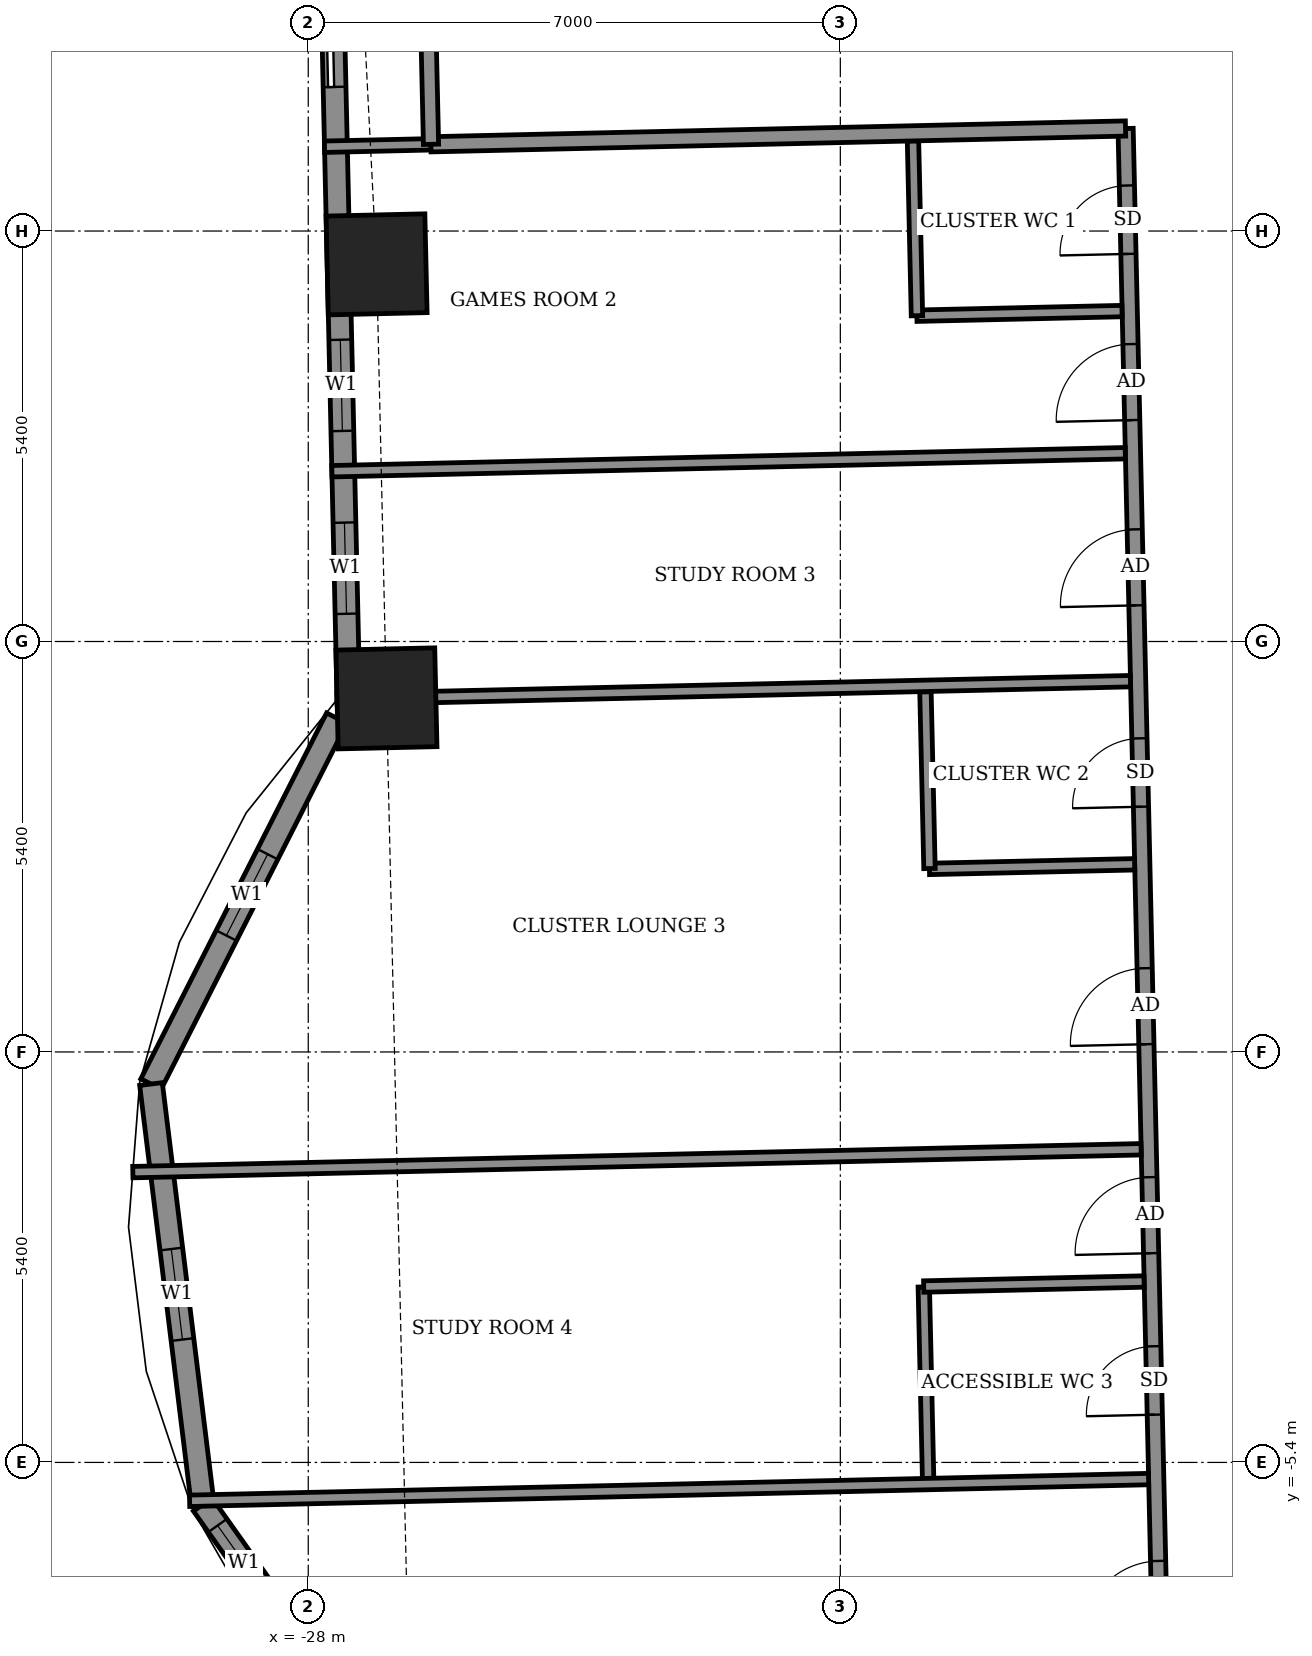
"""IFC4 building model, lengths in metres.
Left out: names, types, materials, properties, quantities, classifications, styles, units other than length and angle.
Written with IfcOpenShell. Run it as: python <this file> out.ifc"""

import sys

from ifc_helpers import new_model, si_unit, direction, frame, frame_2d, origin, origin_2d, place, context, subcontext, project, spatial, rectangle, extrude, element, fill, save


model = new_model("IFC4")
c1 = context("Model", 3, precision=1e-05, world=origin(), true_north=direction((0.0, 1.0)))
c2 = subcontext(c1, "Body", "Model", "MODEL_VIEW")
j1 = project(units=[si_unit("LENGTHUNIT", "METRE"), si_unit("PLANEANGLEUNIT", "RADIAN")], contexts=[c1])
p1 = place(None, origin())
s1 = spatial("IfcSite", under=j1, at=p1, CompositionType="ELEMENT")
p2 = place(p1, origin())
s2 = spatial("IfcBuilding", under=s1, at=p2, CompositionType="ELEMENT")
p3 = place(p2, frame((0.0, 0.0, 137.3)))
s3 = spatial("IfcBuildingStorey", under=s2, at=p3, CompositionType="ELEMENT", Elevation=137.3)
for number, where, z_axis, x_axis in (
    (1, (-27.101, 10.362, -0.55), (0.0, 0.0, 1.0), (0.023, -1.0, 0.0)),
    (2, (-26.971, 4.652, -0.55), (0.0, 0.0, 1.0), (0.023, -1.0, 0.0)),
):
    element("IfcColumn", number, at=place(p3, frame(where, z_axis=z_axis, x_axis=x_axis)), inside=s3, PredefinedType="COLUMN", context=c2, shape_type="SweptSolid", body=[
        extrude(rectangle(XDim=1.3, YDim=1.3, at=origin_2d()), origin(), (0.0, 0.0, 1.0), 3.6),
    ])
p4 = place(p3, frame((-27.727, 15.912, 0.0), z_axis=(0.0, 0.0, 1.0), x_axis=(0.022690078929, -0.999742547018, 0.0)))
e3 = element("IfcWall", 3, at=p4, inside=s3, PredefinedType="SOLIDWALL", context=c2, shape_type="SweptSolid", body=[
    extrude(rectangle(XDim=11.33, YDim=0.3, at=frame_2d((5.665, 0.0))), origin(), (0.0, 0.0, 1.0), 3.05),
])
p5 = place(p4, frame((1.717, 0.0, 0.0)))
e4 = element("IfcOpeningElement", 4, at=p5, cuts=e3, PredefinedType="OPENING", context=c2, shape_type="SweptSolid", body=[
    extrude(rectangle(XDim=1.5, YDim=2.4, at=frame_2d((0.75, 1.2))), frame((0.0, 0.16, 0.0), z_axis=(0.0, -1.0, 0.0), x_axis=(1.0, 0.0, 0.0)), (0.0, 0.0, 1.0), 0.32),
])
p6 = place(p4, frame((6.544, 0.0, 0.9)))
e5 = element("IfcOpeningElement", 5, at=p6, cuts=e3, PredefinedType="OPENING", context=c2, shape_type="SweptSolid", body=[
    extrude(rectangle(XDim=1.2, YDim=1.5, at=frame_2d((0.6, 0.75))), frame((0.0, 0.16, 0.0), z_axis=(0.0, -1.0, 0.0), x_axis=(1.0, 0.0, 0.0)), (0.0, 0.0, 1.0), 0.32),
])
p7 = place(p4, frame((8.95, 0.0, 0.9)))
e6 = element("IfcOpeningElement", 6, at=p7, cuts=e3, PredefinedType="OPENING", context=c2, shape_type="SweptSolid", body=[
    extrude(rectangle(XDim=1.2, YDim=1.5, at=frame_2d((0.6, 0.75))), frame((0.0, 0.16, 0.0), z_axis=(0.0, -1.0, 0.0), x_axis=(1.0, 0.0, 0.0)), (0.0, 0.0, 1.0), 0.32),
])
p8 = place(p3, frame((-27.625, 4.392, 0.0), z_axis=(0.0, 0.0, 1.0), x_axis=(-0.45268572245, -0.891670138947, 0.0)))
e7 = element("IfcWall", 7, at=p8, inside=s3, PredefinedType="SOLIDWALL", context=c2, shape_type="SweptSolid", body=[
    extrude(rectangle(XDim=5.399, YDim=0.3, at=frame_2d((2.7, 0.0))), origin(), (0.0, 0.0, 1.0), 3.05),
])
p9 = place(p8, frame((2.008, 0.0, 0.9)))
e8 = element("IfcOpeningElement", 8, at=p9, cuts=e7, PredefinedType="OPENING", context=c2, shape_type="SweptSolid", body=[
    extrude(rectangle(XDim=1.2, YDim=1.5, at=frame_2d((0.6, 0.75))), frame((0.0, 0.16, 0.0), z_axis=(0.0, -1.0, 0.0), x_axis=(1.0, 0.0, 0.0)), (0.0, 0.0, 1.0), 0.32),
])
p10 = place(p3, frame((-30.069, -0.422, 0.0), z_axis=(0.0, 0.0, 1.0), x_axis=(0.122206978992, -0.992504636909, 0.0)))
e9 = element("IfcWall", 9, at=p10, inside=s3, PredefinedType="SOLIDWALL", context=c2, shape_type="SweptSolid", body=[
    extrude(rectangle(XDim=5.574, YDim=0.3, at=frame_2d((2.787, 0.0))), origin(), (0.0, 0.0, 1.0), 3.05),
])
p11 = place(p10, frame((2.187, 0.0, 0.9)))
e10 = element("IfcOpeningElement", 10, at=p11, cuts=e9, PredefinedType="OPENING", context=c2, shape_type="SweptSolid", body=[
    extrude(rectangle(XDim=1.2, YDim=1.5, at=frame_2d((0.6, 0.75))), frame((0.0, 0.16, 0.0), z_axis=(0.0, -1.0, 0.0), x_axis=(1.0, 0.0, 0.0)), (0.0, 0.0, 1.0), 0.32),
])
p12 = place(p3, frame((-29.388, -5.954, 0.0), z_axis=(0.0, 0.0, 1.0), x_axis=(0.578095163598, -0.815969351033, 0.0)))
e11 = element("IfcWall", 11, at=p12, inside=s3, PredefinedType="SOLIDWALL", context=c2, shape_type="SweptSolid", body=[
    extrude(rectangle(XDim=3.569, YDim=0.3, at=frame_2d((1.784, 0.0))), origin(), (0.0, 0.0, 1.0), 3.05),
])
p13 = place(p12, frame((0.338, 0.0, 0.9)))
e12 = element("IfcOpeningElement", 12, at=p13, cuts=e11, PredefinedType="OPENING", context=c2, shape_type="SweptSolid", body=[
    extrude(rectangle(XDim=1.2, YDim=1.5, at=frame_2d((0.6, 0.75))), frame((0.0, 0.16, 0.0), z_axis=(0.0, -1.0, 0.0), x_axis=(1.0, 0.0, 0.0)), (0.0, 0.0, 1.0), 0.32),
])
p14 = place(p3, frame((-30.241, 4.827, 0.0), z_axis=(0.0, 0.0, 1.0), x_axis=(-0.022744303924, 0.999741314861, 0.0)))
e13 = element("IfcWall", 13, at=p14, inside=s3, PredefinedType="USERDEFINED", context=c2, shape_type="SweptSolid", body=[
    extrude(rectangle(XDim=3.875, YDim=0.55, at=frame_2d((1.938, 0.0))), origin(), (0.0, 0.0, 1.0), 0.8),
])
p15 = place(p3, frame((-16.603, -16.218, 0.0), z_axis=(0.0, 0.0, 1.0), x_axis=(-0.022698146637, 0.999742363881, 0.0)))
e14 = element("IfcWall", 14, at=p15, inside=s3, PredefinedType="PARTITIONING", context=c2, shape_type="SweptSolid", body=[
    extrude(rectangle(XDim=28.374, YDim=0.2, at=frame_2d((14.187, 0.0))), origin(), (0.0, 0.0, 1.0), 3.05),
])
p16 = place(p15, frame((24.537, 0.0, 0.0)))
e15 = element("IfcOpeningElement", 15, at=p16, cuts=e14, PredefinedType="OPENING", context=c2, shape_type="SweptSolid", body=[
    extrude(rectangle(XDim=1.0, YDim=2.1, at=frame_2d((0.5, 1.05))), frame((0.0, 0.11, 0.0), z_axis=(0.0, -1.0, 0.0), x_axis=(1.0, 0.0, 0.0)), (0.0, 0.0, 1.0), 0.22),
])
p17 = place(p15, frame((26.724, 0.0, 0.0)))
e16 = element("IfcOpeningElement", 16, at=p17, cuts=e14, PredefinedType="OPENING", context=c2, shape_type="SweptSolid", body=[
    extrude(rectangle(XDim=0.9, YDim=2.1, at=frame_2d((0.45, 1.05))), frame((0.0, 0.11, 0.0), z_axis=(0.0, -1.0, 0.0), x_axis=(1.0, 0.0, 0.0)), (0.0, 0.0, 1.0), 0.22),
])
p18 = place(p15, frame((22.099, 0.0, 0.0)))
e17 = element("IfcOpeningElement", 17, at=p18, cuts=e14, PredefinedType="OPENING", context=c2, shape_type="SweptSolid", body=[
    extrude(rectangle(XDim=1.0, YDim=2.1, at=frame_2d((0.5, 1.05))), frame((0.0, 0.11, 0.0), z_axis=(0.0, -1.0, 0.0), x_axis=(1.0, 0.0, 0.0)), (0.0, 0.0, 1.0), 0.22),
])
p19 = place(p15, frame((16.324, 0.0, 0.0)))
e18 = element("IfcOpeningElement", 18, at=p19, cuts=e14, PredefinedType="OPENING", context=c2, shape_type="SweptSolid", body=[
    extrude(rectangle(XDim=1.0, YDim=2.1, at=frame_2d((0.5, 1.05))), frame((0.0, 0.11, 0.0), z_axis=(0.0, -1.0, 0.0), x_axis=(1.0, 0.0, 0.0)), (0.0, 0.0, 1.0), 0.22),
])
p20 = place(p15, frame((19.449, 0.0, 0.0)))
e19 = element("IfcOpeningElement", 19, at=p20, cuts=e14, PredefinedType="OPENING", context=c2, shape_type="SweptSolid", body=[
    extrude(rectangle(XDim=0.9, YDim=2.1, at=frame_2d((0.45, 1.05))), frame((0.0, 0.11, 0.0), z_axis=(0.0, -1.0, 0.0), x_axis=(1.0, 0.0, 0.0)), (0.0, 0.0, 1.0), 0.22),
])
p21 = place(p15, frame((13.574, 0.0, 0.0)))
e20 = element("IfcOpeningElement", 20, at=p21, cuts=e14, PredefinedType="OPENING", context=c2, shape_type="SweptSolid", body=[
    extrude(rectangle(XDim=1.0, YDim=2.1, at=frame_2d((0.5, 1.05))), frame((0.0, 0.11, 0.0), z_axis=(0.0, -1.0, 0.0), x_axis=(1.0, 0.0, 0.0)), (0.0, 0.0, 1.0), 0.22),
])
p22 = place(p15, frame((11.449, 0.0, 0.0)))
e21 = element("IfcOpeningElement", 21, at=p22, cuts=e14, PredefinedType="OPENING", context=c2, shape_type="SweptSolid", body=[
    extrude(rectangle(XDim=0.9, YDim=2.1, at=frame_2d((0.45, 1.05))), frame((0.0, 0.11, 0.0), z_axis=(0.0, -1.0, 0.0), x_axis=(1.0, 0.0, 0.0)), (0.0, 0.0, 1.0), 0.22),
])
p23 = place(p15, frame((8.524, 0.0, 0.0)))
e22 = element("IfcOpeningElement", 22, at=p23, cuts=e14, PredefinedType="OPENING", context=c2, shape_type="SweptSolid", body=[
    extrude(rectangle(XDim=1.0, YDim=2.1, at=frame_2d((0.5, 1.05))), frame((0.0, 0.11, 0.0), z_axis=(0.0, -1.0, 0.0), x_axis=(1.0, 0.0, 0.0)), (0.0, 0.0, 1.0), 0.22),
])
p24 = place(p15, frame((5.325, 0.0, 0.0)))
e23 = element("IfcOpeningElement", 23, at=p24, cuts=e14, PredefinedType="OPENING", context=c2, shape_type="SweptSolid", body=[
    extrude(rectangle(XDim=1.0, YDim=2.1, at=frame_2d((0.5, 1.05))), frame((0.0, 0.11, 0.0), z_axis=(0.0, -1.0, 0.0), x_axis=(1.0, 0.0, 0.0)), (0.0, 0.0, 1.0), 0.22),
])
p25 = place(p15, frame((2.85, 0.0, 0.0)))
e24 = element("IfcOpeningElement", 24, at=p25, cuts=e14, PredefinedType="OPENING", context=c2, shape_type="SweptSolid", body=[
    extrude(rectangle(XDim=1.0, YDim=2.1, at=frame_2d((0.5, 1.05))), frame((0.0, 0.11, 0.0), z_axis=(0.0, -1.0, 0.0), x_axis=(1.0, 0.0, 0.0)), (0.0, 0.0, 1.0), 0.22),
])
p26 = place(p15, frame((0.75, 0.0, 0.0)))
e25 = element("IfcOpeningElement", 25, at=p26, cuts=e14, PredefinedType="OPENING", context=c2, shape_type="SweptSolid", body=[
    extrude(rectangle(XDim=0.9, YDim=2.1, at=frame_2d((0.45, 1.05))), frame((0.0, 0.11, 0.0), z_axis=(0.0, -1.0, 0.0), x_axis=(1.0, 0.0, 0.0)), (0.0, 0.0, 1.0), 0.22),
])
p27 = place(p3, frame((-19.845, -5.615, 0.0), z_axis=(0.0, 0.0, 1.0), x_axis=(-0.022629142889, 0.99974392816, 0.0)))
e26 = element("IfcWall", 26, at=p27, inside=s3, PredefinedType="PARTITIONING", context=c2, shape_type="SweptSolid", body=[
    extrude(rectangle(XDim=2.525, YDim=0.15, at=frame_2d((1.262, 0.0))), origin(), (0.0, 0.0, 1.0), 3.05),
])
p28 = place(p3, frame((-29.561, -5.905, 0.0), z_axis=(0.0, 0.0, 1.0), x_axis=(0.999742903154, 0.022674381858, 0.0)))
e27 = element("IfcWall", 27, at=p28, inside=s3, PredefinedType="PARTITIONING", context=c2, shape_type="SweptSolid", body=[
    extrude(rectangle(XDim=12.619, YDim=0.15, at=frame_2d((6.31, 0.0))), origin(), (0.0, 0.0, 1.0), 2.1),
])
p29 = place(p3, frame((-19.903, -3.086, 0.0), z_axis=(0.0, 0.0, 1.0), x_axis=(0.999741618182, 0.022730967319, 0.0)))
e28 = element("IfcWall", 28, at=p29, inside=s3, PredefinedType="PARTITIONING", context=c2, shape_type="SweptSolid", body=[
    extrude(rectangle(XDim=2.9, YDim=0.15, at=frame_2d((1.45, 0.0))), origin(), (0.0, 0.0, 1.0), 3.05),
])
p30 = place(p3, frame((-30.308, -1.581, 0.0), z_axis=(0.0, 0.0, 1.0), x_axis=(0.999742613892, 0.022687132236, 0.0)))
e29 = element("IfcWall", 29, at=p30, inside=s3, PredefinedType="PARTITIONING", context=c2, shape_type="SweptSolid", body=[
    extrude(rectangle(XDim=13.269, YDim=0.15, at=frame_2d((6.634, 0.0))), origin(), (0.0, 0.0, 1.0), 2.1),
])
p31 = place(p3, frame((-19.828, 2.408, 0.0), z_axis=(0.0, 0.0, 1.0), x_axis=(0.99974458177, 0.022600248254, 0.0)))
e30 = element("IfcWall", 30, at=p31, inside=s3, PredefinedType="PARTITIONING", context=c2, shape_type="SweptSolid", body=[
    extrude(rectangle(XDim=2.701, YDim=0.15, at=frame_2d((1.35, 0.0))), origin(), (0.0, 0.0, 1.0), 3.05),
])
p32 = place(p3, frame((-19.827, 2.413, 0.0), z_axis=(0.0, 0.0, 1.0), x_axis=(-0.02279059109, 0.999740260747, 0.0)))
e31 = element("IfcWall", 31, at=p32, inside=s3, PredefinedType="PARTITIONING", context=c2, shape_type="SweptSolid", body=[
    extrude(rectangle(XDim=2.324, YDim=0.15, at=frame_2d((1.162, 0.0))), origin(), (0.0, 0.0, 1.0), 3.05),
])
p33 = place(p3, frame((-27.621, 4.641, 0.0), z_axis=(0.0, 0.0, 1.0), x_axis=(0.999742728106, 0.022682098664, 0.0)))
e32 = element("IfcWall", 32, at=p33, inside=s3, PredefinedType="PARTITIONING", context=c2, shape_type="SweptSolid", body=[
    extrude(rectangle(XDim=10.441, YDim=0.15, at=frame_2d((5.22, 0.0))), origin(), (0.0, 0.0, 1.0), 3.05),
])
p34 = place(p3, frame((-27.689, 7.64, 0.0), z_axis=(0.0, 0.0, 1.0), x_axis=(0.99974219758, 0.022705470222, 0.0)))
e33 = element("IfcWall", 33, at=p34, inside=s3, PredefinedType="PARTITIONING", context=c2, shape_type="SweptSolid", body=[
    extrude(rectangle(XDim=10.441, YDim=0.15, at=frame_2d((5.22, 0.0))), origin(), (0.0, 0.0, 1.0), 2.55),
])
p35 = place(p3, frame((-19.993, 9.686, 0.0), z_axis=(0.0, 0.0, 1.0), x_axis=(0.999744396973, 0.02260842146, 0.0)))
e34 = element("IfcWall", 34, at=p35, inside=s3, PredefinedType="PARTITIONING", context=c2, shape_type="SweptSolid", body=[
    extrude(rectangle(XDim=2.7, YDim=0.15, at=frame_2d((1.35, 0.0))), origin(), (0.0, 0.0, 1.0), 3.05),
])
p36 = place(p3, frame((-19.992, 9.686, 0.0), z_axis=(0.0, 0.0, 1.0), x_axis=(-0.022612884682, 0.999744296031, 0.0)))
e35 = element("IfcWall", 35, at=p36, inside=s3, PredefinedType="PARTITIONING", context=c2, shape_type="SweptSolid", body=[
    extrude(rectangle(XDim=2.3, YDim=0.15, at=frame_2d((1.15, 0.0))), origin(), (0.0, 0.0, 1.0), 3.05),
])
p37 = place(p3, frame((-27.786, 11.909, 0.0), z_axis=(0.0, 0.0, 1.0), x_axis=(0.999740216184, 0.022792545827, 0.0)))
e36 = element("IfcWall", 36, at=p37, inside=s3, PredefinedType="PARTITIONING", context=c2, shape_type="SweptSolid", body=[
    extrude(rectangle(XDim=1.403, YDim=0.15, at=frame_2d((0.702, 0.0))), origin(), (0.0, 0.0, 1.0), 2.55),
])
p38 = place(p3, frame((-26.387, 11.941, 0.0), z_axis=(0.0, 0.0, 1.0), x_axis=(0.999741076645, 0.022754772455, 0.0)))
e37 = element("IfcWall", 37, at=p38, inside=s3, PredefinedType="PARTITIONING", context=c2, shape_type="SweptSolid", body=[
    extrude(rectangle(XDim=9.141, YDim=0.2, at=frame_2d((4.571, 0.0))), origin(), (0.0, 0.0, 1.0), 3.05),
])
p39 = place(p3, frame((-26.385, 11.941, 0.0), z_axis=(0.0, 0.0, 1.0), x_axis=(-0.022617910375, 0.999744182344, 0.0)))
e38 = element("IfcWall", 38, at=p39, inside=s3, PredefinedType="PARTITIONING", context=c2, shape_type="SweptSolid", body=[
    extrude(rectangle(XDim=1.5, YDim=0.2, at=frame_2d((0.75, 0.0))), origin(), (0.0, 0.0, 1.0), 3.05),
])
p40 = place(p5, origin())
e39 = element("IfcDoor", 39, at=p40, inside=s3, OperationType="SLIDING_TO_LEFT", PredefinedType="DOOR", context=c2, shape_type="SweptSolid", body=[
    extrude(rectangle(XDim=1.5, YDim=2.4, at=frame_2d((0.75, 1.2))), frame((0.0, 0.025, 0.0), z_axis=(0.0, -1.0, 0.0), x_axis=(1.0, 0.0, 0.0)), (0.0, 0.0, 1.0), 0.05),
])
fill(e4, e39)
p41 = place(p6, origin())
e40 = element("IfcWindow", 40, at=p41, inside=s3, PartitioningType="SINGLE_PANEL", PredefinedType="WINDOW", context=c2, shape_type="SweptSolid", body=[
    extrude(rectangle(XDim=1.2, YDim=1.5, at=frame_2d((0.6, 0.75))), frame((0.0, 0.03, 0.0), z_axis=(0.0, -1.0, 0.0), x_axis=(1.0, 0.0, 0.0)), (0.0, 0.0, 1.0), 0.06),
])
fill(e5, e40)
p42 = place(p7, origin())
e41 = element("IfcWindow", 41, at=p42, inside=s3, PartitioningType="SINGLE_PANEL", PredefinedType="WINDOW", context=c2, shape_type="SweptSolid", body=[
    extrude(rectangle(XDim=1.2, YDim=1.5, at=frame_2d((0.6, 0.75))), frame((0.0, 0.03, 0.0), z_axis=(0.0, -1.0, 0.0), x_axis=(1.0, 0.0, 0.0)), (0.0, 0.0, 1.0), 0.06),
])
fill(e6, e41)
p43 = place(p9, origin())
e42 = element("IfcWindow", 42, at=p43, inside=s3, PartitioningType="SINGLE_PANEL", PredefinedType="WINDOW", context=c2, shape_type="SweptSolid", body=[
    extrude(rectangle(XDim=1.2, YDim=1.5, at=frame_2d((0.6, 0.75))), frame((0.0, 0.03, 0.0), z_axis=(0.0, -1.0, 0.0), x_axis=(1.0, 0.0, 0.0)), (0.0, 0.0, 1.0), 0.06),
])
fill(e8, e42)
p44 = place(p11, origin())
e43 = element("IfcWindow", 43, at=p44, inside=s3, PartitioningType="SINGLE_PANEL", PredefinedType="WINDOW", context=c2, shape_type="SweptSolid", body=[
    extrude(rectangle(XDim=1.2, YDim=1.5, at=frame_2d((0.6, 0.75))), frame((0.0, 0.03, 0.0), z_axis=(0.0, -1.0, 0.0), x_axis=(1.0, 0.0, 0.0)), (0.0, 0.0, 1.0), 0.06),
])
fill(e10, e43)
p45 = place(p13, origin())
e44 = element("IfcWindow", 44, at=p45, inside=s3, PartitioningType="SINGLE_PANEL", PredefinedType="WINDOW", context=c2, shape_type="SweptSolid", body=[
    extrude(rectangle(XDim=1.2, YDim=1.5, at=frame_2d((0.6, 0.75))), frame((0.0, 0.03, 0.0), z_axis=(0.0, -1.0, 0.0), x_axis=(1.0, 0.0, 0.0)), (0.0, 0.0, 1.0), 0.06),
])
fill(e12, e44)
p46 = place(p16, origin())
e45 = element("IfcDoor", 45, at=p46, inside=s3, OperationType="SINGLE_SWING_RIGHT", PredefinedType="DOOR", context=c2, shape_type="SweptSolid", body=[
    extrude(rectangle(XDim=1.0, YDim=2.1, at=frame_2d((0.5, 1.05))), frame((0.0, 0.025, 0.0), z_axis=(0.0, -1.0, 0.0), x_axis=(1.0, 0.0, 0.0)), (0.0, 0.0, 1.0), 0.05),
])
fill(e15, e45)
p47 = place(p17, origin())
e46 = element("IfcDoor", 46, at=p47, inside=s3, OperationType="SINGLE_SWING_LEFT", PredefinedType="DOOR", context=c2, shape_type="SweptSolid", body=[
    extrude(rectangle(XDim=0.9, YDim=2.1, at=frame_2d((0.45, 1.05))), frame((0.0, 0.025, 0.0), z_axis=(0.0, -1.0, 0.0), x_axis=(1.0, 0.0, 0.0)), (0.0, 0.0, 1.0), 0.05),
])
fill(e16, e46)
p48 = place(p18, origin())
e47 = element("IfcDoor", 47, at=p48, inside=s3, OperationType="SINGLE_SWING_LEFT", PredefinedType="DOOR", context=c2, shape_type="SweptSolid", body=[
    extrude(rectangle(XDim=1.0, YDim=2.1, at=frame_2d((0.5, 1.05))), frame((0.0, 0.025, 0.0), z_axis=(0.0, -1.0, 0.0), x_axis=(1.0, 0.0, 0.0)), (0.0, 0.0, 1.0), 0.05),
])
fill(e17, e47)
p49 = place(p19, origin())
e48 = element("IfcDoor", 48, at=p49, inside=s3, OperationType="SINGLE_SWING_RIGHT", PredefinedType="DOOR", context=c2, shape_type="SweptSolid", body=[
    extrude(rectangle(XDim=1.0, YDim=2.1, at=frame_2d((0.5, 1.05))), frame((0.0, 0.025, 0.0), z_axis=(0.0, -1.0, 0.0), x_axis=(1.0, 0.0, 0.0)), (0.0, 0.0, 1.0), 0.05),
])
fill(e18, e48)
p50 = place(p20, origin())
e49 = element("IfcDoor", 49, at=p50, inside=s3, OperationType="SINGLE_SWING_RIGHT", PredefinedType="DOOR", context=c2, shape_type="SweptSolid", body=[
    extrude(rectangle(XDim=0.9, YDim=2.1, at=frame_2d((0.45, 1.05))), frame((0.0, 0.025, 0.0), z_axis=(0.0, -1.0, 0.0), x_axis=(1.0, 0.0, 0.0)), (0.0, 0.0, 1.0), 0.05),
])
fill(e19, e49)
p51 = place(p21, origin())
e50 = element("IfcDoor", 50, at=p51, inside=s3, OperationType="SINGLE_SWING_LEFT", PredefinedType="DOOR", context=c2, shape_type="SweptSolid", body=[
    extrude(rectangle(XDim=1.0, YDim=2.1, at=frame_2d((0.5, 1.05))), frame((0.0, 0.025, 0.0), z_axis=(0.0, -1.0, 0.0), x_axis=(1.0, 0.0, 0.0)), (0.0, 0.0, 1.0), 0.05),
])
fill(e20, e50)
p52 = place(p22, origin())
e51 = element("IfcDoor", 51, at=p52, inside=s3, OperationType="SINGLE_SWING_LEFT", PredefinedType="DOOR", context=c2, shape_type="SweptSolid", body=[
    extrude(rectangle(XDim=0.9, YDim=2.1, at=frame_2d((0.45, 1.05))), frame((0.0, 0.025, 0.0), z_axis=(0.0, -1.0, 0.0), x_axis=(1.0, 0.0, 0.0)), (0.0, 0.0, 1.0), 0.05),
])
fill(e21, e51)
p53 = place(p23, origin())
e52 = element("IfcDoor", 52, at=p53, inside=s3, OperationType="SINGLE_SWING_RIGHT", PredefinedType="DOOR", context=c2, shape_type="SweptSolid", body=[
    extrude(rectangle(XDim=1.0, YDim=2.1, at=frame_2d((0.5, 1.05))), frame((0.0, 0.025, 0.0), z_axis=(0.0, -1.0, 0.0), x_axis=(1.0, 0.0, 0.0)), (0.0, 0.0, 1.0), 0.05),
])
fill(e22, e52)
save(model, sys.argv[1])
